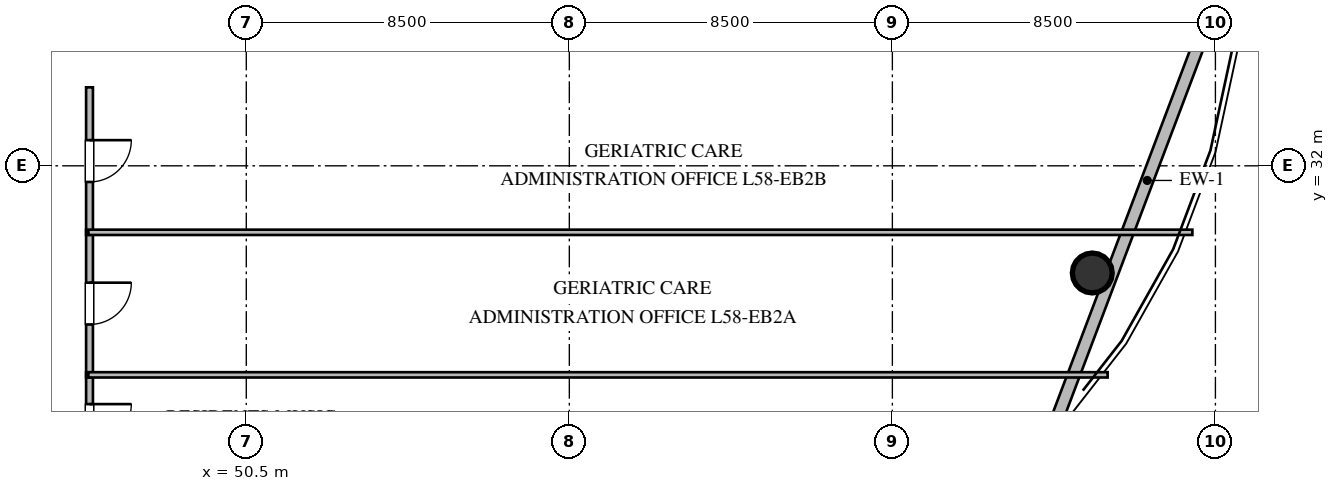
"""IFC4 building model, lengths in metres.
Left out: names, types, materials, properties, quantities, classifications, styles, units other than length and angle.
Written with IfcOpenShell. Run it as: python <this file> out.ifc"""

import sys

from ifc_helpers import new_model, si_unit, direction, frame, frame_2d, origin, origin_2d, place, context, subcontext, project, spatial, rectangle, circle, extrude, element, fill, save


model = new_model("IFC4")
c1 = context("Model", 3, precision=1e-05, world=origin(), true_north=direction((0.0, 1.0)))
c2 = subcontext(c1, "Body", "Model", "MODEL_VIEW")
j1 = project(units=[si_unit("LENGTHUNIT", "METRE"), si_unit("PLANEANGLEUNIT", "RADIAN")], contexts=[c1])
p1 = place(None, origin())
s1 = spatial("IfcSite", under=j1, at=p1, CompositionType="ELEMENT")
p2 = place(p1, origin())
s2 = spatial("IfcBuilding", under=s1, at=p2, CompositionType="ELEMENT")
p3 = place(p2, frame((0.0, 0.0, 220.8)))
s3 = spatial("IfcBuildingStorey", under=s2, at=p3, CompositionType="ELEMENT", Elevation=220.8)
p4 = place(p3, frame((72.76, 29.18, 0.0), z_axis=(0.0, 0.0, 1.0), x_axis=(1.0, 0.0, 0.0)))
e1 = element("IfcColumn", 1, at=p4, inside=s3, PredefinedType="COLUMN", context=c2, shape_type="SweptSolid", body=[
    extrude(circle(Radius=0.525, at=origin_2d()), origin(), (0.0, 0.0, 1.0), 3.6),
])
p5 = place(p3, frame((76.712, 38.243, 0.0), z_axis=(0.0, 0.0, 1.0), x_axis=(-0.353659523244, -0.935374225441, 0.0)))
e2 = element("IfcWall", 2, at=p5, inside=s3, PredefinedType="STANDARD", context=c2, shape_type="SweptSolid", body=[
    extrude(rectangle(XDim=14.172, YDim=0.32, at=frame_2d((7.086, 0.0))), origin(), (0.0, 0.0, 1.0), 3.36),
])
p6 = place(p3, frame((46.375, 26.565, 0.0), z_axis=(0.0, 0.0, 1.0), x_axis=(0.0, -1.0, 0.0)))
e3 = element("IfcWall", 3, at=p6, inside=s3, PredefinedType="PARTITIONING", context=c2, shape_type="SweptSolid", body=[
    extrude(rectangle(XDim=2.77, YDim=0.18, at=frame_2d((1.385, 0.0))), origin(), (0.0, 0.0, 1.0), 3.36),
])
p7 = place(p6, frame((0.835, 0.0, 0.0)))
e4 = element("IfcOpeningElement", 4, at=p7, cuts=e3, PredefinedType="OPENING", context=c2, shape_type="SweptSolid", body=[
    extrude(rectangle(XDim=1.1, YDim=2.1, at=frame_2d((0.55, 1.05))), frame((0.0, 0.1, 0.0), z_axis=(0.0, -1.0, 0.0), x_axis=(1.0, 0.0, 0.0)), (0.0, 0.0, 1.0), 0.2),
])
p8 = place(p3, frame((46.375, 30.315, 0.0), z_axis=(0.0, 0.0, 1.0), x_axis=(0.0, -1.0, 0.0)))
e5 = element("IfcWall", 5, at=p8, inside=s3, PredefinedType="PARTITIONING", context=c2, shape_type="SweptSolid", body=[
    extrude(rectangle(XDim=3.88, YDim=0.18, at=frame_2d((1.94, 0.0))), origin(), (0.0, 0.0, 1.0), 3.36),
])
p9 = place(p8, frame((1.39, 0.0, 0.0)))
e6 = element("IfcOpeningElement", 6, at=p9, cuts=e5, PredefinedType="OPENING", context=c2, shape_type="SweptSolid", body=[
    extrude(rectangle(XDim=1.1, YDim=2.1, at=frame_2d((0.55, 1.05))), frame((0.0, 0.1, 0.0), z_axis=(0.0, -1.0, 0.0), x_axis=(1.0, 0.0, 0.0)), (0.0, 0.0, 1.0), 0.2),
])
p10 = place(p3, frame((46.375, 34.065, 0.0), z_axis=(0.0, 0.0, 1.0), x_axis=(0.0, -1.0, 0.0)))
e7 = element("IfcWall", 7, at=p10, inside=s3, PredefinedType="PARTITIONING", context=c2, shape_type="SweptSolid", body=[
    extrude(rectangle(XDim=3.88, YDim=0.18, at=frame_2d((1.94, 0.0))), origin(), (0.0, 0.0, 1.0), 3.36),
])
p11 = place(p10, frame((1.39, 0.0, 0.0)))
e8 = element("IfcOpeningElement", 8, at=p11, cuts=e7, PredefinedType="OPENING", context=c2, shape_type="SweptSolid", body=[
    extrude(rectangle(XDim=1.1, YDim=2.1, at=frame_2d((0.55, 1.05))), frame((0.0, 0.1, 0.0), z_axis=(0.0, -1.0, 0.0), x_axis=(1.0, 0.0, 0.0)), (0.0, 0.0, 1.0), 0.2),
])
p12 = place(p3, frame((46.345, 26.5, 0.0), z_axis=(0.0, 0.0, 1.0), x_axis=(1.0, 0.0, 0.0)))
e9 = element("IfcWall", 9, at=p12, inside=s3, PredefinedType="PARTITIONING", context=c2, shape_type="SweptSolid", body=[
    extrude(rectangle(XDim=26.819, YDim=0.14, at=frame_2d((13.41, 0.0))), origin(), (0.0, 0.0, 1.0), 2.806),
])
p13 = place(p3, frame((46.345, 30.25, 0.0), z_axis=(0.0, 0.0, 1.0), x_axis=(1.0, 0.0, 0.0)))
e10 = element("IfcWall", 10, at=p13, inside=s3, PredefinedType="PARTITIONING", context=c2, shape_type="SweptSolid", body=[
    extrude(rectangle(XDim=29.049, YDim=0.14, at=frame_2d((14.524, 0.0))), origin(), (0.0, 0.0, 1.0), 3.36),
])
p14 = place(p7, origin())
e11 = element("IfcDoor", 11, at=p14, inside=s3, OperationType="SINGLE_SWING_LEFT", PredefinedType="DOOR", context=c2, shape_type="SweptSolid", body=[
    extrude(rectangle(XDim=1.1, YDim=2.1, at=frame_2d((0.55, 1.05))), frame((0.0, 0.025, 0.0), z_axis=(0.0, -1.0, 0.0), x_axis=(1.0, 0.0, 0.0)), (0.0, 0.0, 1.0), 0.05),
])
fill(e4, e11)
p15 = place(p9, origin())
e12 = element("IfcDoor", 12, at=p15, inside=s3, OperationType="SINGLE_SWING_LEFT", PredefinedType="DOOR", context=c2, shape_type="SweptSolid", body=[
    extrude(rectangle(XDim=1.1, YDim=2.1, at=frame_2d((0.55, 1.05))), frame((0.0, 0.025, 0.0), z_axis=(0.0, -1.0, 0.0), x_axis=(1.0, 0.0, 0.0)), (0.0, 0.0, 1.0), 0.05),
])
fill(e6, e12)
p16 = place(p11, origin())
e13 = element("IfcDoor", 13, at=p16, inside=s3, OperationType="SINGLE_SWING_LEFT", PredefinedType="DOOR", context=c2, shape_type="SweptSolid", body=[
    extrude(rectangle(XDim=1.1, YDim=2.1, at=frame_2d((0.55, 1.05))), frame((0.0, 0.025, 0.0), z_axis=(0.0, -1.0, 0.0), x_axis=(1.0, 0.0, 0.0)), (0.0, 0.0, 1.0), 0.05),
])
fill(e8, e13)
save(model, sys.argv[1])
